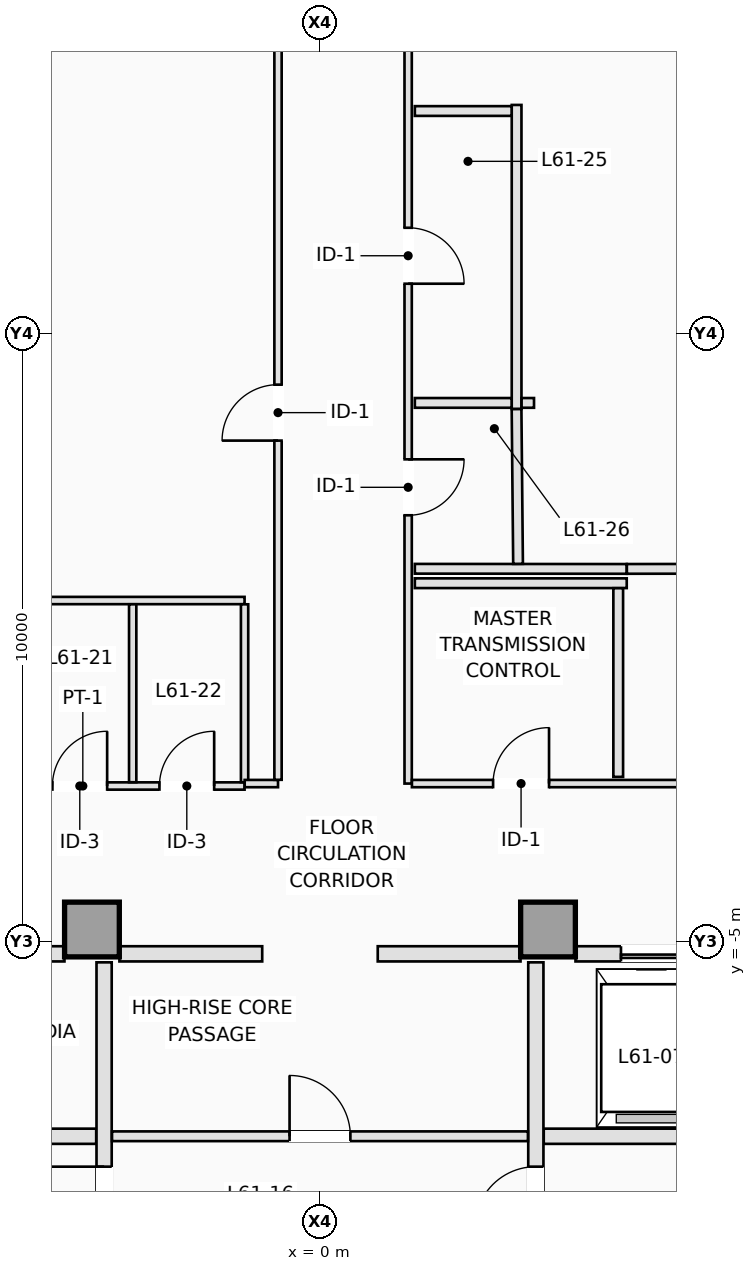
"""IFC4 building model, lengths in metres.
Left out: names, types, materials, properties, quantities, classifications, styles, units other than length and angle.
Written with IfcOpenShell. Run it as: python <this file> out.ifc"""

import sys

from ifc_helpers import new_model, si_unit, direction, frame, frame_2d, origin, origin_2d, place, context, subcontext, project, spatial, rectangle, extrude, element, fill, save


model = new_model("IFC4")
c1 = context("Model", 3, precision=1e-05, world=origin(), true_north=direction((0.0, 1.0)))
c2 = subcontext(c1, "Body", "Model", "MODEL_VIEW")
j1 = project(units=[si_unit("LENGTHUNIT", "METRE"), si_unit("PLANEANGLEUNIT", "RADIAN")], contexts=[c1])
p1 = place(None, origin())
s1 = spatial("IfcSite", under=j1, at=p1, CompositionType="ELEMENT")
p2 = place(p1, origin())
s2 = spatial("IfcBuilding", under=s1, at=p2, CompositionType="ELEMENT")
p3 = place(p2, frame((0.0, 0.0, 221.9)))
s3 = spatial("IfcBuildingStorey", under=s2, at=p3, CompositionType="ELEMENT", Elevation=221.9)
for number, where, z_axis, x_axis in (
    (1, (-3.75, -4.8, 0.0), (0.0, 0.0, 1.0), (1.0, 0.0, 0.0)),
    (2, (3.75, -4.8, 0.0), (0.0, 0.0, 1.0), (1.0, 0.0, 0.0)),
):
    element("IfcColumn", number, at=place(p3, frame(where, z_axis=z_axis, x_axis=x_axis)), inside=s3, PredefinedType="COLUMN", context=c2, shape_type="SweptSolid", body=[
        extrude(rectangle(XDim=0.9, YDim=0.9, at=origin_2d()), origin(), (0.0, 0.0, 1.0), 3.5),
    ])
for number, where, z_axis, x_axis in (
    (3, (-8.92, -8.2, 0.0), (0.0, 0.0, 1.0), (1.0, 0.0, 0.0)),
    (4, (3.68, -8.2, 0.0), (0.0, 0.0, 1.0), (1.0, 0.0, 0.0)),
):
    element("IfcWall", number, at=place(p3, frame(where, z_axis=z_axis, x_axis=x_axis)), inside=s3, PredefinedType="PARTITIONING", context=c2, shape_type="SweptSolid", body=[
        extrude(rectangle(XDim=5.24, YDim=0.25, at=frame_2d((2.62, 0.0))), origin(), (0.0, 0.0, 1.0), 3.25),
    ])
p4 = place(p3, frame((-3.55, -15.898, 0.0), z_axis=(0.0, 0.0, 1.0), x_axis=(0.0, 1.0, 0.0)))
e5 = element("IfcWall", 5, at=p4, inside=s3, PredefinedType="PARTITIONING", context=c2, shape_type="SweptSolid", body=[
    extrude(rectangle(XDim=10.558, YDim=0.25, at=frame_2d((5.279, 0.0))), origin(), (0.0, 0.0, 1.0), 3.25),
])
p5 = place(p4, frame((6.198, 0.0, 0.0)))
e6 = element("IfcOpeningElement", 6, at=p5, cuts=e5, PredefinedType="OPENING", context=c2, shape_type="SweptSolid", body=[
    extrude(rectangle(XDim=1.0, YDim=2.15, at=frame_2d((0.5, 1.075))), frame((0.0, 0.135, 0.0), z_axis=(0.0, -1.0, 0.0), x_axis=(1.0, 0.0, 0.0)), (0.0, 0.0, 1.0), 0.27),
])
p6 = place(p3, frame((3.55, -15.898, 0.0), z_axis=(0.0, 0.0, 1.0), x_axis=(0.0, 1.0, 0.0)))
e7 = element("IfcWall", 7, at=p6, inside=s3, PredefinedType="PARTITIONING", context=c2, shape_type="SweptSolid", body=[
    extrude(rectangle(XDim=10.558, YDim=0.25, at=frame_2d((5.279, 0.0))), origin(), (0.0, 0.0, 1.0), 3.25),
])
p7 = place(p6, frame((6.198, 0.0, 0.0)))
e8 = element("IfcOpeningElement", 8, at=p7, cuts=e7, PredefinedType="OPENING", context=c2, shape_type="SweptSolid", body=[
    extrude(rectangle(XDim=1.0, YDim=2.15, at=frame_2d((0.5, 1.075))), frame((0.0, 0.135, 0.0), z_axis=(0.0, -1.0, 0.0), x_axis=(1.0, 0.0, 0.0)), (0.0, 0.0, 1.0), 0.27),
])
p8 = place(p3, frame((-12.48, -5.2, 0.0), z_axis=(0.0, 0.0, 1.0), x_axis=(1.0, 0.0, 0.0)))
e9 = element("IfcWall", 9, at=p8, inside=s3, PredefinedType="PARTITIONING", context=c2, shape_type="SweptSolid", body=[
    extrude(rectangle(XDim=8.278, YDim=0.25, at=frame_2d((4.139, 0.0))), origin(), (0.0, 0.0, 1.0), 3.25),
])
p9 = place(p8, frame((3.05, 0.0, 0.0)))
e10 = element("IfcOpeningElement", 10, at=p9, cuts=e9, PredefinedType="OPENING", context=c2, shape_type="SweptSolid", body=[
    extrude(rectangle(XDim=0.92, YDim=2.12, at=frame_2d((0.46, 1.06))), frame((0.0, 0.135, 0.0), z_axis=(0.0, -1.0, 0.0), x_axis=(1.0, 0.0, 0.0)), (0.0, 0.0, 1.0), 0.27),
])
p10 = place(p8, frame((6.15, 0.0, 0.0)))
e11 = element("IfcOpeningElement", 11, at=p10, cuts=e9, PredefinedType="OPENING", context=c2, shape_type="SweptSolid", body=[
    extrude(rectangle(XDim=0.92, YDim=2.12, at=frame_2d((0.46, 1.06))), frame((0.0, 0.135, 0.0), z_axis=(0.0, -1.0, 0.0), x_axis=(1.0, 0.0, 0.0)), (0.0, 0.0, 1.0), 0.27),
])
p11 = place(p3, frame((4.202, -5.2, 0.0), z_axis=(0.0, 0.0, 1.0), x_axis=(1.0, 0.0, 0.0)))
e12 = element("IfcWall", 12, at=p11, inside=s3, PredefinedType="PARTITIONING", context=c2, shape_type="SweptSolid", body=[
    extrude(rectangle(XDim=8.278, YDim=0.25, at=frame_2d((4.139, 0.0))), origin(), (0.0, 0.0, 1.0), 3.25),
])
p12 = place(p11, frame((0.748, 0.0, 0.0)))
e13 = element("IfcOpeningElement", 13, at=p12, cuts=e12, PredefinedType="OPENING", context=c2, shape_type="SweptSolid", body=[
    extrude(rectangle(XDim=1.0, YDim=2.15, at=frame_2d((0.5, 1.075))), frame((0.0, 0.135, 0.0), z_axis=(0.0, -1.0, 0.0), x_axis=(1.0, 0.0, 0.0)), (0.0, 0.0, 1.0), 0.27),
])
p13 = place(p11, frame((2.698, 0.0, 0.0)))
e14 = element("IfcOpeningElement", 14, at=p13, cuts=e12, PredefinedType="OPENING", context=c2, shape_type="SweptSolid", body=[
    extrude(rectangle(XDim=1.0, YDim=2.15, at=frame_2d((0.5, 1.075))), frame((0.0, 0.135, 0.0), z_axis=(0.0, -1.0, 0.0), x_axis=(1.0, 0.0, 0.0)), (0.0, 0.0, 1.0), 0.27),
])
p14 = place(p11, frame((4.648, 0.0, 0.0)))
e15 = element("IfcOpeningElement", 15, at=p14, cuts=e12, PredefinedType="OPENING", context=c2, shape_type="SweptSolid", body=[
    extrude(rectangle(XDim=1.0, YDim=2.15, at=frame_2d((0.5, 1.075))), frame((0.0, 0.135, 0.0), z_axis=(0.0, -1.0, 0.0), x_axis=(1.0, 0.0, 0.0)), (0.0, 0.0, 1.0), 0.27),
])
p15 = place(p11, frame((6.598, 0.0, 0.0)))
e16 = element("IfcOpeningElement", 16, at=p15, cuts=e12, PredefinedType="OPENING", context=c2, shape_type="SweptSolid", body=[
    extrude(rectangle(XDim=1.0, YDim=2.15, at=frame_2d((0.5, 1.075))), frame((0.0, 0.135, 0.0), z_axis=(0.0, -1.0, 0.0), x_axis=(1.0, 0.0, 0.0)), (0.0, 0.0, 1.0), 0.27),
])
for number, where, z_axis, x_axis in (
    (17, (-3.298, -5.2, 0.0), (0.0, 0.0, 1.0), (1.0, 0.0, 0.0)),
    (18, (0.95, -5.2, 0.0), (0.0, 0.0, 1.0), (1.0, 0.0, 0.0)),
):
    element("IfcWall", number, at=place(p3, frame(where, z_axis=z_axis, x_axis=x_axis)), inside=s3, PredefinedType="PARTITIONING", context=c2, shape_type="SweptSolid", body=[
        extrude(rectangle(XDim=2.348, YDim=0.25, at=frame_2d((1.174, 0.0))), origin(), (0.0, 0.0, 1.0), 3.25),
    ])
p16 = place(p3, frame((-3.42, -8.2, 0.0), z_axis=(0.0, 0.0, 1.0), x_axis=(1.0, 0.0, 0.0)))
e19 = element("IfcWall", 19, at=p16, inside=s3, PredefinedType="PARTITIONING", context=c2, shape_type="SweptSolid", body=[
    extrude(rectangle(XDim=6.84, YDim=0.16, at=frame_2d((3.42, 0.0))), origin(), (0.0, 0.0, 1.0), 3.25),
])
p17 = place(p16, frame((2.92, 0.0, 0.0)))
e20 = element("IfcOpeningElement", 20, at=p17, cuts=e19, PredefinedType="OPENING", context=c2, shape_type="SweptSolid", body=[
    extrude(rectangle(XDim=1.0, YDim=2.15, at=frame_2d((0.5, 1.075))), frame((0.0, 0.09, 0.0), z_axis=(0.0, -1.0, 0.0), x_axis=(1.0, 0.0, 0.0)), (0.0, 0.0, 1.0), 0.18),
])
p18 = place(p3, frame((-6.56, -2.44, 0.0), z_axis=(0.0, 0.0, 1.0), x_axis=(1.0, 0.0, 0.0)))
e21 = element("IfcWall", 21, at=p18, inside=s3, PredefinedType="PARTITIONING", context=c2, shape_type="SweptSolid", body=[
    extrude(rectangle(XDim=5.32, YDim=0.12, at=frame_2d((2.66, 0.0))), origin(), (0.0, 0.0, 1.0), 2.943),
])
p19 = place(p18, frame((0.42, 0.0, 0.0)))
e22 = element("IfcOpeningElement", 22, at=p19, cuts=e21, PredefinedType="OPENING", context=c2, shape_type="SweptSolid", body=[
    extrude(rectangle(XDim=0.9, YDim=2.12, at=frame_2d((0.45, 1.06))), frame((0.0, 0.07, 0.0), z_axis=(0.0, -1.0, 0.0), x_axis=(1.0, 0.0, 0.0)), (0.0, 0.0, 1.0), 0.14),
])
p20 = place(p18, frame((2.16, 0.0, 0.0)))
e23 = element("IfcOpeningElement", 23, at=p20, cuts=e21, PredefinedType="OPENING", context=c2, shape_type="SweptSolid", body=[
    extrude(rectangle(XDim=0.9, YDim=2.12, at=frame_2d((0.45, 1.06))), frame((0.0, 0.07, 0.0), z_axis=(0.0, -1.0, 0.0), x_axis=(1.0, 0.0, 0.0)), (0.0, 0.0, 1.0), 0.14),
])
p21 = place(p18, frame((3.92, 0.0, 0.0)))
e24 = element("IfcOpeningElement", 24, at=p21, cuts=e21, PredefinedType="OPENING", context=c2, shape_type="SweptSolid", body=[
    extrude(rectangle(XDim=0.9, YDim=2.12, at=frame_2d((0.45, 1.06))), frame((0.0, 0.07, 0.0), z_axis=(0.0, -1.0, 0.0), x_axis=(1.0, 0.0, 0.0)), (0.0, 0.0, 1.0), 0.14),
])
p22 = place(p3, frame((-6.56, 0.61, 0.0), z_axis=(0.0, 0.0, 1.0), x_axis=(1.0, 0.0, 0.0)))
e25 = element("IfcWall", 25, at=p22, inside=s3, PredefinedType="PARTITIONING", context=c2, shape_type="SweptSolid", body=[
    extrude(rectangle(XDim=5.32, YDim=0.12, at=frame_2d((2.66, 0.0))), origin(), (0.0, 0.0, 1.0), 3.25),
])
for number, where, z_axis, x_axis in (
    (26, (-3.08, -2.378, 0.0), (0.0, 0.0, 1.0), (0.0, 1.0, 0.0)),
    (27, (-1.24, -2.378, 0.0), (0.0, 0.0, 1.0), (0.0, 1.0, 0.0)),
):
    element("IfcWall", number, at=place(p3, frame(where, z_axis=z_axis, x_axis=x_axis)), inside=s3, PredefinedType="PARTITIONING", context=c2, shape_type="SweptSolid", body=[
        extrude(rectangle(XDim=2.926, YDim=0.12, at=frame_2d((1.463, 0.0))), origin(), (0.0, 0.0, 1.0), 3.25),
    ])
p23 = place(p3, frame((-1.238, -2.4, 0.0), z_axis=(0.0, 0.0, 1.0), x_axis=(1.0, 0.0, 0.0)))
e28 = element("IfcWall", 28, at=p23, inside=s3, PredefinedType="PARTITIONING", context=c2, shape_type="SweptSolid", body=[
    extrude(rectangle(XDim=0.548, YDim=0.12, at=frame_2d((0.274, 0.0))), origin(), (0.0, 0.0, 1.0), 2.943),
])
p24 = place(p3, frame((-0.69, -2.338, 0.0), z_axis=(0.0, 0.0, 1.0), x_axis=(0.0, 1.0, 0.0)))
e29 = element("IfcWall", 29, at=p24, inside=s3, PredefinedType="PARTITIONING", context=c2, shape_type="SweptSolid", body=[
    extrude(rectangle(XDim=12.138, YDim=0.12, at=frame_2d((6.069, 0.0))), origin(), (0.0, 0.0, 1.0), 3.25),
])
p25 = place(p24, frame((5.578, 0.0, 0.0)))
e30 = element("IfcOpeningElement", 30, at=p25, cuts=e29, PredefinedType="OPENING", context=c2, shape_type="SweptSolid", body=[
    extrude(rectangle(XDim=0.92, YDim=2.12, at=frame_2d((0.46, 1.06))), frame((0.0, 0.07, 0.0), z_axis=(0.0, -1.0, 0.0), x_axis=(1.0, 0.0, 0.0)), (0.0, 0.0, 1.0), 0.14),
])
p26 = place(p3, frame((1.45, 9.738, 0.0), z_axis=(0.0, 0.0, 1.0), x_axis=(0.0, -1.0, 0.0)))
e31 = element("IfcWall", 31, at=p26, inside=s3, PredefinedType="PARTITIONING", context=c2, shape_type="SweptSolid", body=[
    extrude(rectangle(XDim=12.138, YDim=0.12, at=frame_2d((6.069, 0.0))), origin(), (0.0, 0.0, 1.0), 3.25),
])
p27 = place(p26, frame((2.998, 0.0, 0.0)))
e32 = element("IfcOpeningElement", 32, at=p27, cuts=e31, PredefinedType="OPENING", context=c2, shape_type="SweptSolid", body=[
    extrude(rectangle(XDim=0.92, YDim=2.12, at=frame_2d((0.46, 1.06))), frame((0.0, 0.07, 0.0), z_axis=(0.0, -1.0, 0.0), x_axis=(1.0, 0.0, 0.0)), (0.0, 0.0, 1.0), 0.14),
])
p28 = place(p26, frame((6.806, 0.0, 0.0)))
e33 = element("IfcOpeningElement", 33, at=p28, cuts=e31, PredefinedType="OPENING", context=c2, shape_type="SweptSolid", body=[
    extrude(rectangle(XDim=0.92, YDim=2.12, at=frame_2d((0.46, 1.06))), frame((0.0, 0.07, 0.0), z_axis=(0.0, -1.0, 0.0), x_axis=(1.0, 0.0, 0.0)), (0.0, 0.0, 1.0), 0.14),
])
p29 = place(p3, frame((1.512, -2.4, 0.0), z_axis=(0.0, 0.0, 1.0), x_axis=(1.0, 0.0, 0.0)))
e34 = element("IfcWall", 34, at=p29, inside=s3, PredefinedType="PARTITIONING", context=c2, shape_type="SweptSolid", body=[
    extrude(rectangle(XDim=10.898, YDim=0.12, at=frame_2d((5.449, 0.0))), origin(), (0.0, 0.0, 1.0), 2.943),
])
p30 = place(p29, frame((4.59, 0.0, 0.0)))
e35 = element("IfcOpeningElement", 35, at=p30, cuts=e34, PredefinedType="OPENING", context=c2, shape_type="SweptSolid", body=[
    extrude(rectangle(XDim=0.92, YDim=2.12, at=frame_2d((0.46, 1.06))), frame((0.0, 0.07, 0.0), z_axis=(0.0, -1.0, 0.0), x_axis=(1.0, 0.0, 0.0)), (0.0, 0.0, 1.0), 0.14),
])
p31 = place(p29, frame((1.335, 0.0, 0.0)))
e36 = element("IfcOpeningElement", 36, at=p31, cuts=e34, PredefinedType="OPENING", context=c2, shape_type="SweptSolid", body=[
    extrude(rectangle(XDim=0.92, YDim=2.12, at=frame_2d((0.46, 1.06))), frame((0.0, 0.07, 0.0), z_axis=(0.0, -1.0, 0.0), x_axis=(1.0, 0.0, 0.0)), (0.0, 0.0, 1.0), 0.14),
])
p32 = place(p29, frame((8.883, 0.0, 0.0)))
e37 = element("IfcOpeningElement", 37, at=p32, cuts=e34, PredefinedType="OPENING", context=c2, shape_type="SweptSolid", body=[
    extrude(rectangle(XDim=0.92, YDim=2.12, at=frame_2d((0.46, 1.06))), frame((0.0, 0.07, 0.0), z_axis=(0.0, -1.0, 0.0), x_axis=(1.0, 0.0, 0.0)), (0.0, 0.0, 1.0), 0.14),
])
p33 = place(p3, frame((3.234, 3.76, 0.0), z_axis=(0.0, 0.0, 1.0), x_axis=(0.0, 1.0, 0.0)))
e38 = element("IfcWall", 38, at=p33, inside=s3, PredefinedType="PARTITIONING", context=c2, shape_type="SweptSolid", body=[
    extrude(rectangle(XDim=5.0, YDim=0.16, at=frame_2d((2.5, 0.0))), origin(), (0.0, 0.0, 1.0), 2.722),
])
p34 = place(p3, frame((3.152, 8.66, 0.0), z_axis=(0.0, 0.0, 1.0), x_axis=(-1.0, 0.0, 0.0)))
e39 = element("IfcWall", 39, at=p34, inside=s3, PredefinedType="PARTITIONING", context=c2, shape_type="SweptSolid", body=[
    extrude(rectangle(XDim=1.592, YDim=0.16, at=frame_2d((0.796, 0.0))), origin(), (0.0, 0.0, 1.0), 3.25),
])
p35 = place(p3, frame((5.045, 1.13, 0.0), z_axis=(0.0, 0.0, 1.0), x_axis=(-0.999999801196, 0.000630561074, 0.0)))
e40 = element("IfcWall", 40, at=p35, inside=s3, PredefinedType="PARTITIONING", context=c2, shape_type="SweptSolid", body=[
    extrude(rectangle(XDim=3.485, YDim=0.16, at=frame_2d((1.742, 0.0))), origin(), (0.0, 0.0, 1.0), 3.25),
])
p36 = place(p3, frame((3.257, 1.213, 0.0), z_axis=(0.0, 0.0, 1.0), x_axis=(-0.00959280495, 0.999953987988, 0.0)))
e41 = element("IfcWall", 41, at=p36, inside=s3, PredefinedType="PARTITIONING", context=c2, shape_type="SweptSolid", body=[
    extrude(rectangle(XDim=2.545, YDim=0.16, at=frame_2d((1.272, 0.0))), origin(), (0.0, 0.0, 1.0), 3.25),
])
p37 = place(p3, frame((8.32, 1.134, 0.0), z_axis=(0.0, 0.0, 1.0), x_axis=(-0.999999374216, -0.001118734383, 0.0)))
e42 = element("IfcWall", 42, at=p37, inside=s3, PredefinedType="PARTITIONING", context=c2, shape_type="SweptSolid", body=[
    extrude(rectangle(XDim=3.273, YDim=0.16, at=frame_2d((1.637, 0.0))), origin(), (0.0, 0.0, 1.0), 3.25),
])
p38 = place(p3, frame((3.52, 3.86, 0.0), z_axis=(0.0, 0.0, 1.0), x_axis=(-1.0, 0.0, 0.0)))
e43 = element("IfcWall", 43, at=p38, inside=s3, PredefinedType="PARTITIONING", context=c2, shape_type="SweptSolid", body=[
    extrude(rectangle(XDim=0.204, YDim=0.16, at=frame_2d((0.102, 0.0))), origin(), (0.0, 0.0, 1.0), 3.25),
])
p39 = place(p3, frame((3.152, 3.86, 0.0), z_axis=(0.0, 0.0, 1.0), x_axis=(-1.0, 0.0, 0.0)))
e44 = element("IfcWall", 44, at=p39, inside=s3, PredefinedType="PARTITIONING", context=c2, shape_type="SweptSolid", body=[
    extrude(rectangle(XDim=1.592, YDim=0.16, at=frame_2d((0.796, 0.0))), origin(), (0.0, 0.0, 1.0), 2.943),
])
p40 = place(p3, frame((5.045, 0.895, 0.0), z_axis=(0.0, 0.0, 1.0), x_axis=(-1.0, 0.0, 0.0)))
e45 = element("IfcWall", 45, at=p40, inside=s3, PredefinedType="PARTITIONING", context=c2, shape_type="SweptSolid", body=[
    extrude(rectangle(XDim=3.485, YDim=0.16, at=frame_2d((1.742, 0.0))), origin(), (0.0, 0.0, 1.0), 3.25),
])
p41 = place(p3, frame((4.905, -2.29, 0.0), z_axis=(0.0, 0.0, 1.0), x_axis=(0.0, 1.0, 0.0)))
e46 = element("IfcWall", 46, at=p41, inside=s3, PredefinedType="PARTITIONING", context=c2, shape_type="SweptSolid", body=[
    extrude(rectangle(XDim=3.103, YDim=0.16, at=frame_2d((1.551, 0.0))), origin(), (0.0, 0.0, 1.0), 3.25),
])
p42 = place(p12, origin())
e47 = element("IfcDoor", 47, at=p42, inside=s3, OperationType="SLIDING_TO_RIGHT", PredefinedType="DOOR", context=c2, shape_type="SweptSolid", body=[
    extrude(rectangle(XDim=1.0, YDim=2.15, at=frame_2d((0.5, 1.075))), frame((0.0, 0.025, 0.0), z_axis=(0.0, -1.0, 0.0), x_axis=(1.0, 0.0, 0.0)), (0.0, 0.0, 1.0), 0.05),
])
fill(e13, e47)
p43 = place(p5, origin())
e48 = element("IfcDoor", 48, at=p43, inside=s3, OperationType="SINGLE_SWING_RIGHT", PredefinedType="DOOR", context=c2, shape_type="SweptSolid", body=[
    extrude(rectangle(XDim=1.0, YDim=2.15, at=frame_2d((0.5, 1.075))), frame((0.0, 0.025, 0.0), z_axis=(0.0, -1.0, 0.0), x_axis=(1.0, 0.0, 0.0)), (0.0, 0.0, 1.0), 0.05),
])
fill(e6, e48)
p44 = place(p7, origin())
e49 = element("IfcDoor", 49, at=p44, inside=s3, OperationType="SINGLE_SWING_LEFT", PredefinedType="DOOR", context=c2, shape_type="SweptSolid", body=[
    extrude(rectangle(XDim=1.0, YDim=2.15, at=frame_2d((0.5, 1.075))), frame((0.0, 0.025, 0.0), z_axis=(0.0, -1.0, 0.0), x_axis=(1.0, 0.0, 0.0)), (0.0, 0.0, 1.0), 0.05),
])
fill(e8, e49)
p45 = place(p17, origin())
e50 = element("IfcDoor", 50, at=p45, inside=s3, OperationType="SINGLE_SWING_LEFT", PredefinedType="DOOR", context=c2, shape_type="SweptSolid", body=[
    extrude(rectangle(XDim=1.0, YDim=2.15, at=frame_2d((0.5, 1.075))), frame((0.0, 0.025, 0.0), z_axis=(0.0, -1.0, 0.0), x_axis=(1.0, 0.0, 0.0)), (0.0, 0.0, 1.0), 0.05),
])
fill(e20, e50)
p46 = place(p20, origin())
e51 = element("IfcDoor", 51, at=p46, inside=s3, OperationType="SINGLE_SWING_RIGHT", PredefinedType="DOOR", context=c2, shape_type="SweptSolid", body=[
    extrude(rectangle(XDim=0.9, YDim=2.12, at=frame_2d((0.45, 1.06))), frame((0.0, 0.025, 0.0), z_axis=(0.0, -1.0, 0.0), x_axis=(1.0, 0.0, 0.0)), (0.0, 0.0, 1.0), 0.05),
])
fill(e23, e51)
p47 = place(p21, origin())
e52 = element("IfcDoor", 52, at=p47, inside=s3, OperationType="SINGLE_SWING_RIGHT", PredefinedType="DOOR", context=c2, shape_type="SweptSolid", body=[
    extrude(rectangle(XDim=0.9, YDim=2.12, at=frame_2d((0.45, 1.06))), frame((0.0, 0.025, 0.0), z_axis=(0.0, -1.0, 0.0), x_axis=(1.0, 0.0, 0.0)), (0.0, 0.0, 1.0), 0.05),
])
fill(e24, e52)
p48 = place(p25, origin())
e53 = element("IfcDoor", 53, at=p48, inside=s3, OperationType="SINGLE_SWING_LEFT", PredefinedType="DOOR", context=c2, shape_type="SweptSolid", body=[
    extrude(rectangle(XDim=0.92, YDim=2.12, at=frame_2d((0.46, 1.06))), frame((0.0, 0.025, 0.0), z_axis=(0.0, -1.0, 0.0), x_axis=(1.0, 0.0, 0.0)), (0.0, 0.0, 1.0), 0.05),
])
fill(e30, e53)
p49 = place(p27, origin())
e54 = element("IfcDoor", 54, at=p49, inside=s3, OperationType="SINGLE_SWING_RIGHT", PredefinedType="DOOR", context=c2, shape_type="SweptSolid", body=[
    extrude(rectangle(XDim=0.92, YDim=2.12, at=frame_2d((0.46, 1.06))), frame((0.0, 0.025, 0.0), z_axis=(0.0, -1.0, 0.0), x_axis=(1.0, 0.0, 0.0)), (0.0, 0.0, 1.0), 0.05),
])
fill(e32, e54)
p50 = place(p28, origin())
e55 = element("IfcDoor", 55, at=p50, inside=s3, OperationType="SINGLE_SWING_LEFT", PredefinedType="DOOR", context=c2, shape_type="SweptSolid", body=[
    extrude(rectangle(XDim=0.92, YDim=2.12, at=frame_2d((0.46, 1.06))), frame((0.0, 0.025, 0.0), z_axis=(0.0, -1.0, 0.0), x_axis=(1.0, 0.0, 0.0)), (0.0, 0.0, 1.0), 0.05),
])
fill(e33, e55)
p51 = place(p31, origin())
e56 = element("IfcDoor", 56, at=p51, inside=s3, OperationType="SINGLE_SWING_RIGHT", PredefinedType="DOOR", context=c2, shape_type="SweptSolid", body=[
    extrude(rectangle(XDim=0.92, YDim=2.12, at=frame_2d((0.46, 1.06))), frame((0.0, 0.025, 0.0), z_axis=(0.0, -1.0, 0.0), x_axis=(1.0, 0.0, 0.0)), (0.0, 0.0, 1.0), 0.05),
])
fill(e36, e56)
save(model, sys.argv[1])
